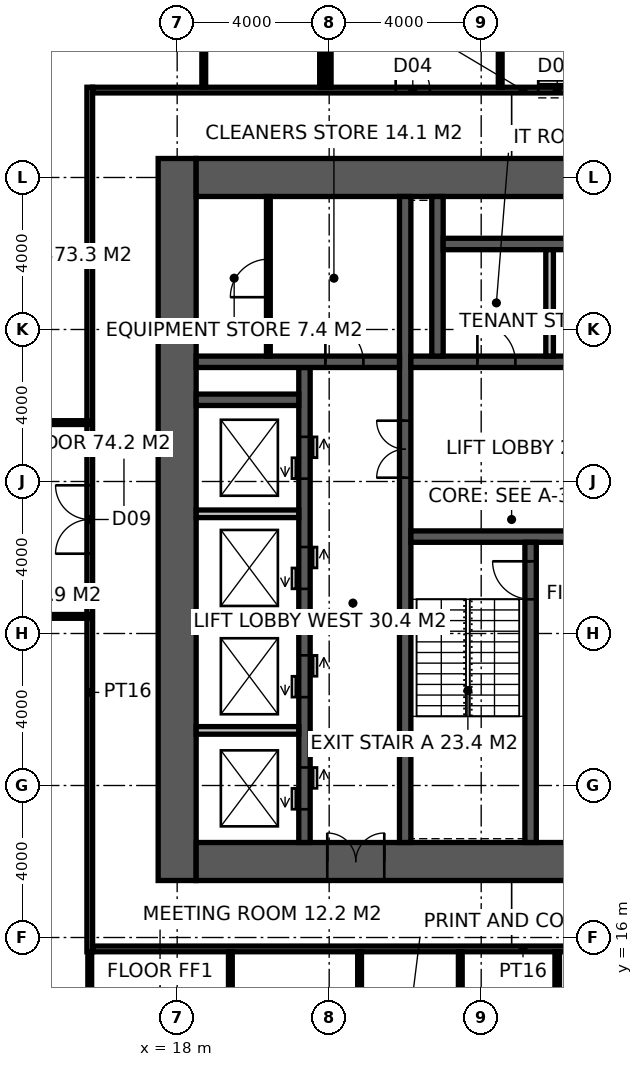
"""IFC4 building model, lengths in metres.
Left out: names, types, materials, properties, quantities, classifications, styles, units other than length and angle.
Written with IfcOpenShell. Run it as: python <this file> out.ifc"""

import sys

from ifc_helpers import new_model, si_unit, direction, frame, frame_2d, origin, place, context, subcontext, project, spatial, rectangle, extrude, element, fill, save


model = new_model("IFC4")
c1 = context("Model", 3, precision=1e-05, world=origin(), true_north=direction((0.0, 1.0)))
c2 = subcontext(c1, "Body", "Model", "MODEL_VIEW")
j1 = project(units=[si_unit("LENGTHUNIT", "METRE"), si_unit("PLANEANGLEUNIT", "RADIAN")], contexts=[c1])
p1 = place(None, origin())
s1 = spatial("IfcSite", under=j1, at=p1, CompositionType="ELEMENT")
p2 = place(p1, origin())
s2 = spatial("IfcBuilding", under=s1, at=p2, CompositionType="ELEMENT")
p3 = place(p2, frame((0.0, 0.0, 234.2)))
s3 = spatial("IfcBuildingStorey", under=s2, at=p3, CompositionType="ELEMENT", Elevation=234.2)
p4 = place(p3, frame((18.0, 17.5, -0.15), z_axis=(0.0, 0.0, 1.0), x_axis=(0.0, 1.0, 0.0)))
e1 = element("IfcWall", 1, at=p4, inside=s3, PredefinedType="SHEAR", context=c2, shape_type="SweptSolid", body=[
    extrude(rectangle(XDim=19.0, YDim=1.0, at=frame_2d((9.5, 0.0))), origin(), (0.0, 0.0, 1.0), 4.0),
])
p5 = place(p3, frame((18.5, 18.0, -0.15), z_axis=(0.0, 0.0, 1.0), x_axis=(1.0, 0.0, 0.0)))
e2 = element("IfcWall", 2, at=p5, inside=s3, PredefinedType="SHEAR", context=c2, shape_type="SweptSolid", body=[
    extrude(rectangle(XDim=17.6, YDim=1.0, at=frame_2d((8.8, 0.0))), origin(), (0.0, 0.0, 1.0), 4.0),
])
p6 = place(p5, frame((3.45, 0.0, 0.15)))
e3 = element("IfcOpeningElement", 3, at=p6, cuts=e2, PredefinedType="OPENING", context=c2, shape_type="SweptSolid", body=[
    extrude(rectangle(XDim=1.5, YDim=2.4, at=frame_2d((0.75, 1.2))), frame((0.0, 0.51, 0.0), z_axis=(0.0, -1.0, 0.0), x_axis=(1.0, 0.0, 0.0)), (0.0, 0.0, 1.0), 1.02),
])
p7 = place(p3, frame((18.5, 36.0, -0.15), z_axis=(0.0, 0.0, 1.0), x_axis=(1.0, 0.0, 0.0)))
e4 = element("IfcWall", 4, at=p7, inside=s3, PredefinedType="SHEAR", context=c2, shape_type="SweptSolid", body=[
    extrude(rectangle(XDim=17.6, YDim=1.0, at=frame_2d((8.8, 0.0))), origin(), (0.0, 0.0, 1.0), 4.0),
])
p8 = place(p3, frame((24.0, 18.5, -0.15), z_axis=(0.0, 0.0, 1.0), x_axis=(0.0, 1.0, 0.0)))
e5 = element("IfcWall", 5, at=p8, inside=s3, PredefinedType="SHEAR", context=c2, shape_type="SweptSolid", body=[
    extrude(rectangle(XDim=17.0, YDim=0.3, at=frame_2d((8.5, 0.0))), origin(), (0.0, 0.0, 1.0), 4.0),
])
p9 = place(p8, frame((9.6, 0.0, 0.15)))
e6 = element("IfcOpeningElement", 6, at=p9, cuts=e5, PredefinedType="OPENING", context=c2, shape_type="SweptSolid", body=[
    extrude(rectangle(XDim=1.5, YDim=2.4, at=frame_2d((0.75, 1.2))), frame((0.0, 0.16, 0.0), z_axis=(0.0, -1.0, 0.0), x_axis=(1.0, 0.0, 0.0)), (0.0, 0.0, 1.0), 0.32),
])
p10 = place(p3, frame((24.15, 26.55, -0.15), z_axis=(0.0, 0.0, 1.0), x_axis=(1.0, 0.0, 0.0)))
e7 = element("IfcWall", 7, at=p10, inside=s3, PredefinedType="SHEAR", context=c2, shape_type="SweptSolid", body=[
    extrude(rectangle(XDim=11.25, YDim=0.3, at=frame_2d((5.625, 0.0))), origin(), (0.0, 0.0, 1.0), 4.0),
])
p11 = place(p10, frame((9.25, 0.0, 0.15)))
e8 = element("IfcOpeningElement", 8, at=p11, cuts=e7, PredefinedType="OPENING", context=c2, shape_type="SweptSolid", body=[
    extrude(rectangle(XDim=1.0, YDim=2.2, at=frame_2d((0.5, 1.1))), frame((0.0, 0.16, 0.0), z_axis=(0.0, -1.0, 0.0), x_axis=(1.0, 0.0, 0.0)), (0.0, 0.0, 1.0), 0.32),
])
p12 = place(p10, frame((4.9, 0.0, 0.15)))
e9 = element("IfcOpeningElement", 9, at=p12, cuts=e7, PredefinedType="OPENING", context=c2, shape_type="SweptSolid", body=[
    extrude(rectangle(XDim=1.5, YDim=2.4, at=frame_2d((0.75, 1.2))), frame((0.0, 0.16, 0.0), z_axis=(0.0, -1.0, 0.0), x_axis=(1.0, 0.0, 0.0)), (0.0, 0.0, 1.0), 0.32),
])
p13 = place(p3, frame((27.3, 18.5, -0.15), z_axis=(0.0, 0.0, 1.0), x_axis=(0.0, 1.0, 0.0)))
e10 = element("IfcWall", 10, at=p13, inside=s3, PredefinedType="SHEAR", context=c2, shape_type="SweptSolid", body=[
    extrude(rectangle(XDim=7.9, YDim=0.3, at=frame_2d((3.95, 0.0))), origin(), (0.0, 0.0, 1.0), 4.0),
])
p14 = place(p13, frame((6.4, 0.0, 0.15)))
e11 = element("IfcOpeningElement", 11, at=p14, cuts=e10, PredefinedType="OPENING", context=c2, shape_type="SweptSolid", body=[
    extrude(rectangle(XDim=1.0, YDim=2.2, at=frame_2d((0.5, 1.1))), frame((0.0, 0.16, 0.0), z_axis=(0.0, -1.0, 0.0), x_axis=(1.0, 0.0, 0.0)), (0.0, 0.0, 1.0), 0.32),
])
p15 = place(p3, frame((24.15, 31.15, -0.15), z_axis=(0.0, 0.0, 1.0), x_axis=(1.0, 0.0, 0.0)))
e12 = element("IfcWall", 12, at=p15, inside=s3, PredefinedType="SHEAR", context=c2, shape_type="SweptSolid", body=[
    extrude(rectangle(XDim=11.25, YDim=0.3, at=frame_2d((5.625, 0.0))), origin(), (0.0, 0.0, 1.0), 4.0),
])
p16 = place(p15, frame((1.75, 0.0, 0.15)))
e13 = element("IfcOpeningElement", 13, at=p16, cuts=e12, PredefinedType="OPENING", context=c2, shape_type="SweptSolid", body=[
    extrude(rectangle(XDim=1.0, YDim=2.2, at=frame_2d((0.5, 1.1))), frame((0.0, 0.16, 0.0), z_axis=(0.0, -1.0, 0.0), x_axis=(1.0, 0.0, 0.0)), (0.0, 0.0, 1.0), 0.32),
])
p17 = place(p15, frame((4.55, 0.0, 0.15)))
e14 = element("IfcOpeningElement", 14, at=p17, cuts=e12, PredefinedType="OPENING", context=c2, shape_type="SweptSolid", body=[
    extrude(rectangle(XDim=1.0, YDim=2.2, at=frame_2d((0.5, 1.1))), frame((0.0, 0.16, 0.0), z_axis=(0.0, -1.0, 0.0), x_axis=(1.0, 0.0, 0.0)), (0.0, 0.0, 1.0), 0.32),
])
p18 = place(p15, frame((7.25, 0.0, 0.15)))
e15 = element("IfcOpeningElement", 15, at=p18, cuts=e12, PredefinedType="OPENING", context=c2, shape_type="SweptSolid", body=[
    extrude(rectangle(XDim=1.4, YDim=2.4, at=frame_2d((0.7, 1.2))), frame((0.0, 0.16, 0.0), z_axis=(0.0, -1.0, 0.0), x_axis=(1.0, 0.0, 0.0)), (0.0, 0.0, 1.0), 0.32),
])
p19 = place(p3, frame((21.35, 18.5, -0.15), z_axis=(0.0, 0.0, 1.0), x_axis=(0.0, 1.0, 0.0)))
e16 = element("IfcWall", 16, at=p19, inside=s3, PredefinedType="SHEAR", context=c2, shape_type="SweptSolid", body=[
    extrude(rectangle(XDim=12.5, YDim=0.3, at=frame_2d((6.25, 0.0))), origin(), (0.0, 0.0, 1.0), 4.0),
])
p20 = place(p19, frame((0.875, 0.0, 0.15)))
e17 = element("IfcOpeningElement", 17, at=p20, cuts=e16, PredefinedType="OPENING", context=c2, shape_type="SweptSolid", body=[
    extrude(rectangle(XDim=1.1, YDim=2.2, at=frame_2d((0.55, 1.1))), frame((0.0, 0.16, 0.0), z_axis=(0.0, -1.0, 0.0), x_axis=(1.0, 0.0, 0.0)), (0.0, 0.0, 1.0), 0.32),
])
p21 = place(p19, frame((3.825, 0.0, 0.15)))
e18 = element("IfcOpeningElement", 18, at=p21, cuts=e16, PredefinedType="OPENING", context=c2, shape_type="SweptSolid", body=[
    extrude(rectangle(XDim=1.1, YDim=2.2, at=frame_2d((0.55, 1.1))), frame((0.0, 0.16, 0.0), z_axis=(0.0, -1.0, 0.0), x_axis=(1.0, 0.0, 0.0)), (0.0, 0.0, 1.0), 0.32),
])
p22 = place(p19, frame((6.675, 0.0, 0.15)))
e19 = element("IfcOpeningElement", 19, at=p22, cuts=e16, PredefinedType="OPENING", context=c2, shape_type="SweptSolid", body=[
    extrude(rectangle(XDim=1.1, YDim=2.2, at=frame_2d((0.55, 1.1))), frame((0.0, 0.16, 0.0), z_axis=(0.0, -1.0, 0.0), x_axis=(1.0, 0.0, 0.0)), (0.0, 0.0, 1.0), 0.32),
])
p23 = place(p19, frame((9.575, 0.0, 0.15)))
e20 = element("IfcOpeningElement", 20, at=p23, cuts=e16, PredefinedType="OPENING", context=c2, shape_type="SweptSolid", body=[
    extrude(rectangle(XDim=1.1, YDim=2.2, at=frame_2d((0.55, 1.1))), frame((0.0, 0.16, 0.0), z_axis=(0.0, -1.0, 0.0), x_axis=(1.0, 0.0, 0.0)), (0.0, 0.0, 1.0), 0.32),
])
p24 = place(p3, frame((18.5, 31.15, -0.15), z_axis=(0.0, 0.0, 1.0), x_axis=(1.0, 0.0, 0.0)))
e21 = element("IfcWall", 21, at=p24, inside=s3, PredefinedType="SHEAR", context=c2, shape_type="SweptSolid", body=[
    extrude(rectangle(XDim=5.35, YDim=0.3, at=frame_2d((2.675, 0.0))), origin(), (0.0, 0.0, 1.0), 4.0),
])
p25 = place(p24, frame((3.4, 0.0, 0.15)))
e22 = element("IfcOpeningElement", 22, at=p25, cuts=e21, PredefinedType="OPENING", context=c2, shape_type="SweptSolid", body=[
    extrude(rectangle(XDim=1.0, YDim=2.2, at=frame_2d((0.5, 1.1))), frame((0.0, 0.16, 0.0), z_axis=(0.0, -1.0, 0.0), x_axis=(1.0, 0.0, 0.0)), (0.0, 0.0, 1.0), 0.32),
])
p26 = place(p3, frame((18.5, 30.15, -0.15), z_axis=(0.0, 0.0, 1.0), x_axis=(1.0, 0.0, 0.0)))
e23 = element("IfcWall", 23, at=p26, inside=s3, PredefinedType="SHEAR", context=c2, shape_type="SweptSolid", body=[
    extrude(rectangle(XDim=2.7, YDim=0.3, at=frame_2d((1.35, 0.0))), origin(), (0.0, 0.0, 1.0), 4.0),
])
p27 = place(p3, frame((24.85, 31.3, -0.15), z_axis=(0.0, 0.0, 1.0), x_axis=(0.0, 1.0, 0.0)))
e24 = element("IfcWall", 24, at=p27, inside=s3, PredefinedType="SHEAR", context=c2, shape_type="SweptSolid", body=[
    extrude(rectangle(XDim=4.2, YDim=0.3, at=frame_2d((2.1, 0.0))), origin(), (0.0, 0.0, 1.0), 4.0),
])
p28 = place(p3, frame((25.0, 34.25, -0.15), z_axis=(0.0, 0.0, 1.0), x_axis=(1.0, 0.0, 0.0)))
e25 = element("IfcWall", 25, at=p28, inside=s3, PredefinedType="SHEAR", context=c2, shape_type="SweptSolid", body=[
    extrude(rectangle(XDim=8.6, YDim=0.3, at=frame_2d((4.3, 0.0))), origin(), (0.0, 0.0, 1.0), 4.0),
])
p29 = place(p3, frame((27.8, 31.3, -0.15), z_axis=(0.0, 0.0, 1.0), x_axis=(0.0, 1.0, 0.0)))
e26 = element("IfcWall", 26, at=p29, inside=s3, PredefinedType="SOLIDWALL", context=c2, shape_type="SweptSolid", body=[
    extrude(rectangle(XDim=2.8, YDim=0.2, at=frame_2d((1.4, 0.0))), origin(), (0.0, 0.0, 1.0), 4.0),
])
for number, where, z_axis, x_axis in (
    (27, (18.5, 21.45, -0.15), (0.0, 0.0, 1.0), (1.0, 0.0, 0.0)),
    (28, (18.5, 24.3, -0.15), (0.0, 0.0, 1.0), (1.0, 0.0, 0.0)),
    (29, (18.5, 27.15, -0.15), (0.0, 0.0, 1.0), (1.0, 0.0, 0.0)),
):
    element("IfcWall", number, at=place(p3, frame(where, z_axis=z_axis, x_axis=x_axis)), inside=s3, PredefinedType="SOLIDWALL", context=c2, shape_type="SweptSolid", body=[
        extrude(rectangle(XDim=2.7, YDim=0.2, at=frame_2d((1.35, 0.0))), origin(), (0.0, 0.0, 1.0), 4.0),
    ])
p30 = place(p3, frame((20.4, 31.3, 0.0), z_axis=(0.0, 0.0, 1.0), x_axis=(0.0, 1.0, 0.0)))
e30 = element("IfcWall", 30, at=p30, inside=s3, PredefinedType="PARTITIONING", context=c2, shape_type="SweptSolid", body=[
    extrude(rectangle(XDim=4.2, YDim=0.1, at=frame_2d((2.1, 0.0))), origin(), (0.0, 0.0, 1.0), 3.85),
])
p31 = place(p30, frame((1.55, 0.0, 0.0)))
e31 = element("IfcOpeningElement", 31, at=p31, cuts=e30, PredefinedType="OPENING", context=c2, shape_type="SweptSolid", body=[
    extrude(rectangle(XDim=1.0, YDim=2.2, at=frame_2d((0.5, 1.1))), frame((0.0, 0.06, 0.0), z_axis=(0.0, -1.0, 0.0), x_axis=(1.0, 0.0, 0.0)), (0.0, 0.0, 1.0), 0.12),
])
p32 = place(p3, frame((15.7, 15.625, 0.0), z_axis=(0.0, 0.0, 1.0), x_axis=(0.0, 1.0, 0.0)))
e32 = element("IfcWall", 32, at=p32, inside=s3, PredefinedType="PARTITIONING", context=c2, shape_type="SweptSolid", body=[
    extrude(rectangle(XDim=22.75, YDim=0.15, at=frame_2d((11.375, 0.0))), origin(), (0.0, 0.0, 1.0), 3.85),
])
p33 = place(p32, frame((10.475, 0.0, 0.0)))
e33 = element("IfcOpeningElement", 33, at=p33, cuts=e32, PredefinedType="OPENING", context=c2, shape_type="SweptSolid", body=[
    extrude(rectangle(XDim=1.8, YDim=2.4, at=frame_2d((0.9, 1.2))), frame((0.0, 0.085, 0.0), z_axis=(0.0, -1.0, 0.0), x_axis=(1.0, 0.0, 0.0)), (0.0, 0.0, 1.0), 0.17),
])
p34 = place(p3, frame((15.775, 15.7, 0.0), z_axis=(0.0, 0.0, 1.0), x_axis=(1.0, 0.0, 0.0)))
e34 = element("IfcWall", 34, at=p34, inside=s3, PredefinedType="PARTITIONING", context=c2, shape_type="SweptSolid", body=[
    extrude(rectangle(XDim=22.65, YDim=0.15, at=frame_2d((11.325, 0.0))), origin(), (0.0, 0.0, 1.0), 3.85),
])
p35 = place(p3, frame((15.775, 38.3, 0.0), z_axis=(0.0, 0.0, 1.0), x_axis=(1.0, 0.0, 0.0)))
e35 = element("IfcWall", 35, at=p35, inside=s3, PredefinedType="PARTITIONING", context=c2, shape_type="SweptSolid", body=[
    extrude(rectangle(XDim=22.65, YDim=0.15, at=frame_2d((11.325, 0.0))), origin(), (0.0, 0.0, 1.0), 3.85),
])
p36 = place(p35, frame((7.975, 0.0, 0.0)))
e36 = element("IfcOpeningElement", 36, at=p36, cuts=e35, PredefinedType="OPENING", context=c2, shape_type="SweptSolid", body=[
    extrude(rectangle(XDim=0.9, YDim=2.1, at=frame_2d((0.45, 1.05))), frame((0.0, 0.085, 0.0), z_axis=(0.0, -1.0, 0.0), x_axis=(1.0, 0.0, 0.0)), (0.0, 0.0, 1.0), 0.17),
])
p37 = place(p35, frame((11.725, 0.0, 0.0)))
e37 = element("IfcOpeningElement", 37, at=p37, cuts=e35, PredefinedType="OPENING", context=c2, shape_type="SweptSolid", body=[
    extrude(rectangle(XDim=1.0, YDim=2.1, at=frame_2d((0.5, 1.05))), frame((0.0, 0.085, 0.0), z_axis=(0.0, -1.0, 0.0), x_axis=(1.0, 0.0, 0.0)), (0.0, 0.0, 1.0), 0.17),
])
p38 = place(p35, frame((15.575, 0.0, 0.0)))
e38 = element("IfcOpeningElement", 38, at=p38, cuts=e35, PredefinedType="OPENING", context=c2, shape_type="SweptSolid", body=[
    extrude(rectangle(XDim=0.9, YDim=2.1, at=frame_2d((0.45, 1.05))), frame((0.0, 0.085, 0.0), z_axis=(0.0, -1.0, 0.0), x_axis=(1.0, 0.0, 0.0)), (0.0, 0.0, 1.0), 0.17),
])
p39 = place(p3, frame((22.0, 38.375, 0.0), z_axis=(0.0, 0.0, 1.0), x_axis=(0.0, 1.0, 0.0)))
e39 = element("IfcWall", 39, at=p39, inside=s3, PredefinedType="PARTITIONING", context=c2, shape_type="SweptSolid", body=[
    extrude(rectangle(XDim=3.675, YDim=0.1, at=frame_2d((1.837, 0.0))), origin(), (0.0, 0.0, 1.0), 2.65),
])
p40 = place(p3, frame((26.5, 38.375, 0.0), z_axis=(0.0, 0.0, 1.0), x_axis=(0.0, 1.0, 0.0)))
e40 = element("IfcWall", 40, at=p40, inside=s3, PredefinedType="PARTITIONING", context=c2, shape_type="SweptSolid", body=[
    extrude(rectangle(XDim=3.575, YDim=0.1, at=frame_2d((1.788, 0.0))), origin(), (0.0, 0.0, 1.0), 2.65),
])
p41 = place(p3, frame((28.0, 8.3, 0.0), z_axis=(0.0, 0.0, 1.0), x_axis=(0.0, 1.0, 0.0)))
e41 = element("IfcWall", 41, at=p41, inside=s3, PredefinedType="PARTITIONING", context=c2, shape_type="SweptSolid", body=[
    extrude(rectangle(XDim=7.325, YDim=0.12, at=frame_2d((3.663, 0.0))), origin(), (0.0, 0.0, 1.0), 3.85),
])
p42 = place(p3, frame((15.7, 12.15, 0.0), z_axis=(0.0, 0.0, 1.0), x_axis=(0.0, 1.0, 0.0)))
e42 = element("IfcWall", 42, at=p42, inside=s3, PredefinedType="PARTITIONING", context=c2, shape_type="SweptSolid", body=[
    extrude(rectangle(XDim=3.475, YDim=0.1, at=frame_2d((1.738, 0.0))), origin(), (0.0, 0.0, 1.0), 3.85),
])
p43 = place(p3, frame((18.7, 38.375, 0.0), z_axis=(0.0, 0.0, 1.0), x_axis=(0.0, 1.0, 0.0)))
e43 = element("IfcWall", 43, at=p43, inside=s3, PredefinedType="PARTITIONING", context=c2, shape_type="SweptSolid", body=[
    extrude(rectangle(XDim=4.075, YDim=0.1, at=frame_2d((2.038, 0.0))), origin(), (0.0, 0.0, 1.0), 3.85),
])
p44 = place(p3, frame((19.4, 12.15, 0.0), z_axis=(0.0, 0.0, 1.0), x_axis=(0.0, 1.0, 0.0)))
e44 = element("IfcWall", 44, at=p44, inside=s3, PredefinedType="PARTITIONING", context=c2, shape_type="SweptSolid", body=[
    extrude(rectangle(XDim=3.475, YDim=0.1, at=frame_2d((1.738, 0.0))), origin(), (0.0, 0.0, 1.0), 3.85),
])
p45 = place(p3, frame((21.8, 38.375, 0.0), z_axis=(0.0, 0.0, 1.0), x_axis=(0.0, 1.0, 0.0)))
e45 = element("IfcWall", 45, at=p45, inside=s3, PredefinedType="PARTITIONING", context=c2, shape_type="SweptSolid", body=[
    extrude(rectangle(XDim=4.075, YDim=0.1, at=frame_2d((2.038, 0.0))), origin(), (0.0, 0.0, 1.0), 2.65),
])
p46 = place(p3, frame((22.8, 12.15, 0.0), z_axis=(0.0, 0.0, 1.0), x_axis=(0.0, 1.0, 0.0)))
e46 = element("IfcWall", 46, at=p46, inside=s3, PredefinedType="PARTITIONING", context=c2, shape_type="SweptSolid", body=[
    extrude(rectangle(XDim=3.475, YDim=0.1, at=frame_2d((1.738, 0.0))), origin(), (0.0, 0.0, 1.0), 3.85),
])
p47 = place(p3, frame((25.45, 12.15, 0.0), z_axis=(0.0, 0.0, 1.0), x_axis=(0.0, 1.0, 0.0)))
e47 = element("IfcWall", 47, at=p47, inside=s3, PredefinedType="PARTITIONING", context=c2, shape_type="SweptSolid", body=[
    extrude(rectangle(XDim=3.475, YDim=0.1, at=frame_2d((1.738, 0.0))), origin(), (0.0, 0.0, 1.0), 2.65),
])
p48 = place(p3, frame((15.7, 29.55, 0.0), z_axis=(0.0, 0.0, 1.0), x_axis=(-1.0, 0.0, 0.0)))
e48 = element("IfcWall", 48, at=p48, inside=s3, PredefinedType="PARTITIONING", context=c2, shape_type="SweptSolid", body=[
    extrude(rectangle(XDim=4.5, YDim=0.1, at=frame_2d((2.25, 0.0))), origin(), (0.0, 0.0, 1.0), 3.85),
])
p49 = place(p3, frame((11.2, 24.45, 0.0), z_axis=(0.0, 0.0, 1.0), x_axis=(1.0, 0.0, 0.0)))
e49 = element("IfcWall", 49, at=p49, inside=s3, PredefinedType="PARTITIONING", context=c2, shape_type="SweptSolid", body=[
    extrude(rectangle(XDim=4.5, YDim=0.1, at=frame_2d((2.25, 0.0))), origin(), (0.0, 0.0, 1.0), 2.65),
])
p50 = place(p14, origin())
e50 = element("IfcDoor", 50, at=p50, inside=s3, OperationType="SINGLE_SWING_RIGHT", PredefinedType="DOOR", context=c2, shape_type="SweptSolid", body=[
    extrude(rectangle(XDim=1.0, YDim=2.2, at=frame_2d((0.5, 1.1))), frame((0.0, 0.025, 0.0), z_axis=(0.0, -1.0, 0.0), x_axis=(1.0, 0.0, 0.0)), (0.0, 0.0, 1.0), 0.05),
])
fill(e11, e50)
p51 = place(p9, origin())
e51 = element("IfcDoor", 51, at=p51, inside=s3, OperationType="DOUBLE_DOOR_DOUBLE_SWING", PredefinedType="DOOR", context=c2, shape_type="SweptSolid", body=[
    extrude(rectangle(XDim=1.5, YDim=2.4, at=frame_2d((0.75, 1.2))), frame((0.0, 0.025, 0.0), z_axis=(0.0, -1.0, 0.0), x_axis=(1.0, 0.0, 0.0)), (0.0, 0.0, 1.0), 0.05),
])
fill(e6, e51)
p52 = place(p25, origin())
e52 = element("IfcDoor", 52, at=p52, inside=s3, OperationType="SINGLE_SWING_LEFT", PredefinedType="DOOR", context=c2, shape_type="SweptSolid", body=[
    extrude(rectangle(XDim=1.0, YDim=2.2, at=frame_2d((0.5, 1.1))), frame((0.0, 0.025, 0.0), z_axis=(0.0, -1.0, 0.0), x_axis=(1.0, 0.0, 0.0)), (0.0, 0.0, 1.0), 0.05),
])
fill(e22, e52)
p53 = place(p31, origin())
e53 = element("IfcDoor", 53, at=p53, inside=s3, OperationType="SINGLE_SWING_LEFT", PredefinedType="DOOR", context=c2, shape_type="SweptSolid", body=[
    extrude(rectangle(XDim=1.0, YDim=2.2, at=frame_2d((0.5, 1.1))), frame((0.0, 0.025, 0.0), z_axis=(0.0, -1.0, 0.0), x_axis=(1.0, 0.0, 0.0)), (0.0, 0.0, 1.0), 0.05),
])
fill(e31, e53)
p54 = place(p16, origin())
e54 = element("IfcDoor", 54, at=p54, inside=s3, OperationType="SINGLE_SWING_LEFT", PredefinedType="DOOR", context=c2, shape_type="SweptSolid", body=[
    extrude(rectangle(XDim=1.0, YDim=2.2, at=frame_2d((0.5, 1.1))), frame((0.0, 0.025, 0.0), z_axis=(0.0, -1.0, 0.0), x_axis=(1.0, 0.0, 0.0)), (0.0, 0.0, 1.0), 0.05),
])
fill(e13, e54)
p55 = place(p6, origin())
e55 = element("IfcDoor", 55, at=p55, inside=s3, OperationType="DOUBLE_DOOR_DOUBLE_SWING", PredefinedType="DOOR", context=c2, shape_type="SweptSolid", body=[
    extrude(rectangle(XDim=1.5, YDim=2.4, at=frame_2d((0.75, 1.2))), frame((0.0, 0.025, 0.0), z_axis=(0.0, -1.0, 0.0), x_axis=(1.0, 0.0, 0.0)), (0.0, 0.0, 1.0), 0.05),
])
fill(e3, e55)
p56 = place(p36, origin())
e56 = element("IfcDoor", 56, at=p56, inside=s3, OperationType="SINGLE_SWING_LEFT", PredefinedType="DOOR", context=c2, shape_type="SweptSolid", body=[
    extrude(rectangle(XDim=0.9, YDim=2.1, at=frame_2d((0.45, 1.05))), frame((0.0, 0.025, 0.0), z_axis=(0.0, -1.0, 0.0), x_axis=(1.0, 0.0, 0.0)), (0.0, 0.0, 1.0), 0.05),
])
fill(e36, e56)
p57 = place(p37, origin())
e57 = element("IfcDoor", 57, at=p57, inside=s3, OperationType="SLIDING_TO_LEFT", PredefinedType="DOOR", context=c2, shape_type="SweptSolid", body=[
    extrude(rectangle(XDim=1.0, YDim=2.1, at=frame_2d((0.5, 1.05))), frame((0.0, 0.025, 0.0), z_axis=(0.0, -1.0, 0.0), x_axis=(1.0, 0.0, 0.0)), (0.0, 0.0, 1.0), 0.05),
])
fill(e37, e57)
p58 = place(p33, origin())
e58 = element("IfcDoor", 58, at=p58, inside=s3, OperationType="DOUBLE_DOOR_DOUBLE_SWING", PredefinedType="DOOR", context=c2, shape_type="SweptSolid", body=[
    extrude(rectangle(XDim=1.8, YDim=2.4, at=frame_2d((0.9, 1.2))), frame((0.0, 0.025, 0.0), z_axis=(0.0, -1.0, 0.0), x_axis=(1.0, 0.0, 0.0)), (0.0, 0.0, 1.0), 0.05),
])
fill(e33, e58)
p59 = place(p20, origin())
e59 = element("IfcDoor", 59, at=p59, inside=s3, OperationType="DOUBLE_DOOR_SLIDING", PredefinedType="DOOR", context=c2, shape_type="SweptSolid", body=[
    extrude(rectangle(XDim=1.1, YDim=2.2, at=frame_2d((0.55, 1.1))), frame((0.0, 0.025, 0.0), z_axis=(0.0, -1.0, 0.0), x_axis=(1.0, 0.0, 0.0)), (0.0, 0.0, 1.0), 0.05),
])
fill(e17, e59)
p60 = place(p21, origin())
e60 = element("IfcDoor", 60, at=p60, inside=s3, OperationType="DOUBLE_DOOR_SLIDING", PredefinedType="DOOR", context=c2, shape_type="SweptSolid", body=[
    extrude(rectangle(XDim=1.1, YDim=2.2, at=frame_2d((0.55, 1.1))), frame((0.0, 0.025, 0.0), z_axis=(0.0, -1.0, 0.0), x_axis=(1.0, 0.0, 0.0)), (0.0, 0.0, 1.0), 0.05),
])
fill(e18, e60)
p61 = place(p22, origin())
e61 = element("IfcDoor", 61, at=p61, inside=s3, OperationType="DOUBLE_DOOR_SLIDING", PredefinedType="DOOR", context=c2, shape_type="SweptSolid", body=[
    extrude(rectangle(XDim=1.1, YDim=2.2, at=frame_2d((0.55, 1.1))), frame((0.0, 0.025, 0.0), z_axis=(0.0, -1.0, 0.0), x_axis=(1.0, 0.0, 0.0)), (0.0, 0.0, 1.0), 0.05),
])
fill(e19, e61)
p62 = place(p23, origin())
e62 = element("IfcDoor", 62, at=p62, inside=s3, OperationType="DOUBLE_DOOR_SLIDING", PredefinedType="DOOR", context=c2, shape_type="SweptSolid", body=[
    extrude(rectangle(XDim=1.1, YDim=2.2, at=frame_2d((0.55, 1.1))), frame((0.0, 0.025, 0.0), z_axis=(0.0, -1.0, 0.0), x_axis=(1.0, 0.0, 0.0)), (0.0, 0.0, 1.0), 0.05),
])
fill(e20, e62)
save(model, sys.argv[1])
